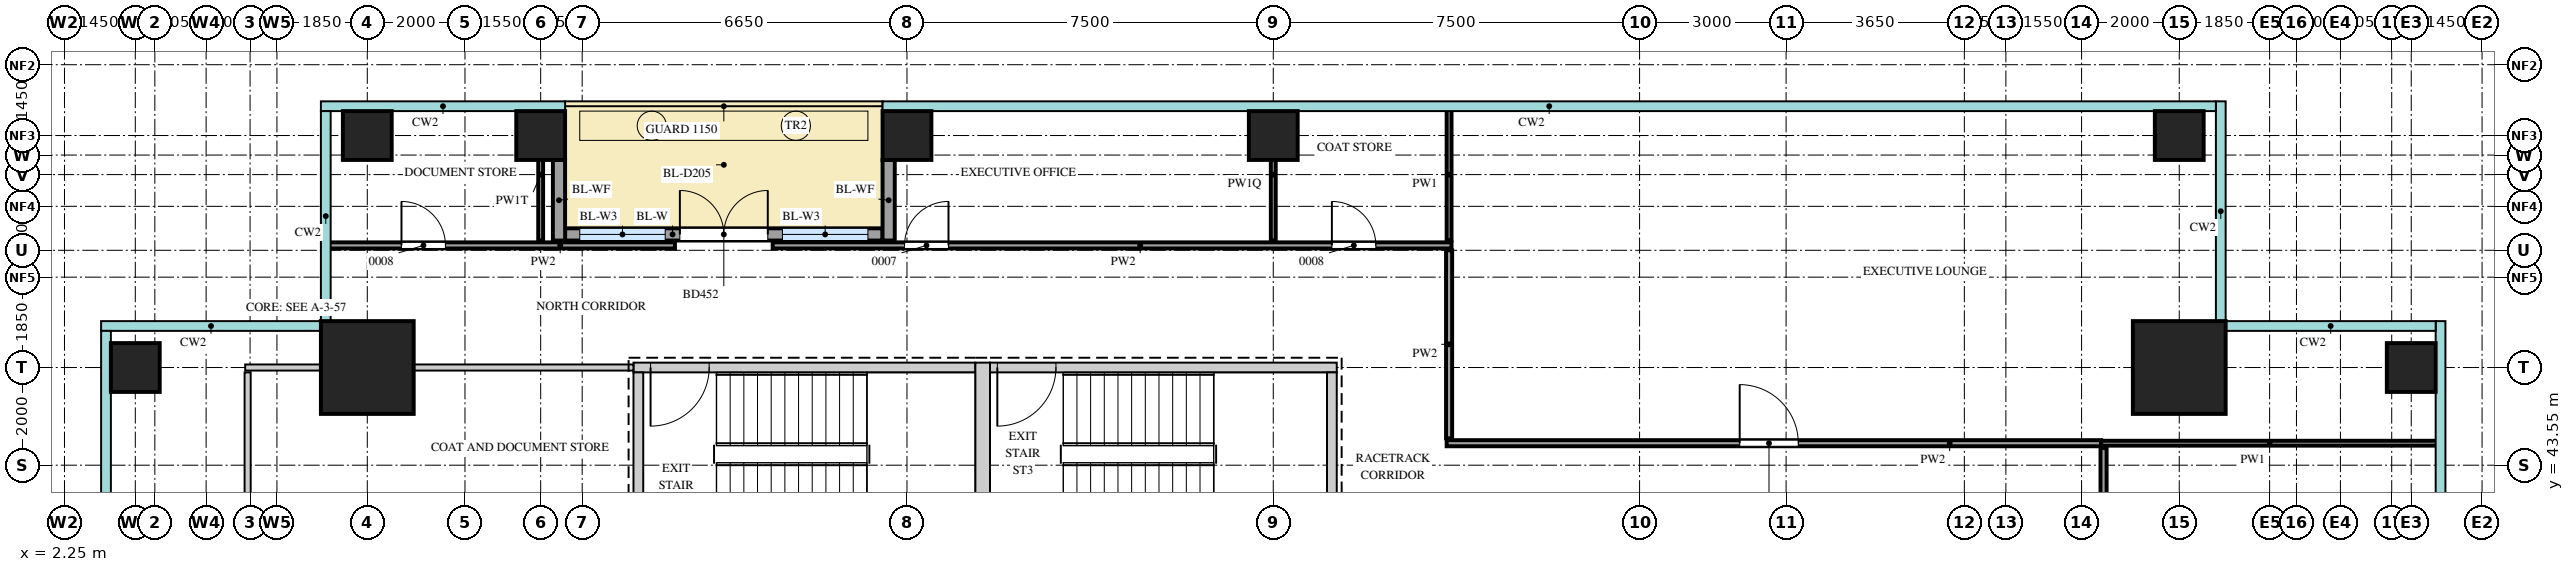
"""IFC4 building model, lengths in metres.
Left out: names, types, materials, properties, quantities, classifications, styles, units other than length and angle.
Written with IfcOpenShell. Run it as: python <this file> out.ifc"""

import sys

from ifc_helpers import new_model, si_unit, direction, frame, frame_2d, origin, origin_2d, place, context, subcontext, project, spatial, rectangle, extrude, source, transform, mapped, element, fill, save


model = new_model("IFC4")
c1 = context("Model", 3, precision=1e-05, world=origin(), true_north=direction((0.0, 1.0)))
c2 = subcontext(c1, "Body", "Model", "MODEL_VIEW")
j1 = project(units=[si_unit("LENGTHUNIT", "METRE"), si_unit("PLANEANGLEUNIT", "RADIAN")], contexts=[c1])
p1 = place(None, origin())
s1 = spatial("IfcSite", under=j1, at=p1, CompositionType="ELEMENT")
p2 = place(p1, origin())
s2 = spatial("IfcBuilding", under=s1, at=p2, CompositionType="ELEMENT")
p3 = place(p2, frame((0.0, 0.0, 204.7)))
s3 = spatial("IfcBuildingStorey", under=s2, at=p3, CompositionType="ELEMENT", Elevation=204.7)
m1 = source(origin(), c2, "Body", "SweptSolid", [
    extrude(rectangle(XDim=7.0, YDim=0.2, at=frame_2d((3.5, 0.0))), origin(), (0.0, 0.0, 1.0), 3.75),
])
p4 = place(p3, frame((13.9, 45.55, 0.0), z_axis=(0.0, 0.0, 1.0), x_axis=(1.0, 0.0, 0.0)))
e1 = element("IfcWall", 1, at=p4, inside=s3, PredefinedType="SHEAR", context=c2, shape_type="MappedRepresentation", body=[
    mapped(m1, transform((0.0, 0.0, 0.0))),
])
m2 = source(origin(), c2, "Body", "SweptSolid", [
    extrude(rectangle(XDim=1.2, YDim=2.1, at=frame_2d((0.6, 1.05))), frame((0.0, 0.11, 0.0), z_axis=(0.0, -1.0, 0.0), x_axis=(1.0, 0.0, 0.0)), (0.0, 0.0, 1.0), 0.22),
])
p5 = place(p4, frame((0.35, 0.0, 0.0)))
e2 = element("IfcOpeningElement", 2, at=p5, cuts=e1, PredefinedType="OPENING", context=c2, shape_type="MappedRepresentation", body=[
    mapped(m2, transform((0.0, 0.0, 0.0))),
])
m3 = source(origin(), c2, "Body", "SweptSolid", [
    extrude(rectangle(XDim=7.1, YDim=0.2, at=frame_2d((3.55, 0.0))), origin(), (0.0, 0.0, 1.0), 3.75),
])
p6 = place(p3, frame((21.2, 45.55, 0.0), z_axis=(0.0, 0.0, 1.0), x_axis=(1.0, 0.0, 0.0)))
e3 = element("IfcWall", 3, at=p6, inside=s3, PredefinedType="SHEAR", context=c2, shape_type="MappedRepresentation", body=[
    mapped(m3, transform((0.0, 0.0, 0.0))),
])
p7 = place(p6, frame((0.15, 0.0, 0.0)))
e4 = element("IfcOpeningElement", 4, at=p7, cuts=e3, PredefinedType="OPENING", context=c2, shape_type="MappedRepresentation", body=[
    mapped(m2, transform((0.0, 0.0, 0.0))),
])
m4 = source(origin(), c2, "Body", "SweptSolid", [
    extrude(rectangle(XDim=3.75, YDim=0.3, at=frame_2d((1.875, 0.0))), origin(), (0.0, 0.0, 1.0), 3.75),
])
p8 = place(p3, frame((21.05, 41.9, 0.0), z_axis=(0.0, 0.0, 1.0), x_axis=(0.0, 1.0, 0.0)))
e5 = element("IfcWall", 5, at=p8, inside=s3, PredefinedType="SHEAR", context=c2, shape_type="MappedRepresentation", body=[
    mapped(m4, transform((0.0, 0.0, 0.0))),
])
m5 = source(origin(), c2, "Body", "SweptSolid", [
    extrude(rectangle(XDim=3.35, YDim=0.2, at=frame_2d((1.675, 0.0))), origin(), (0.0, 0.0, 1.0), 3.75),
])
for number, where, z_axis, x_axis in (
    (6, (14.0, 42.1, 0.0), (0.0, 0.0, 1.0), (0.0, 1.0, 0.0)),
    (7, (28.2, 42.1, 0.0), (0.0, 0.0, 1.0), (0.0, 1.0, 0.0)),
):
    element("IfcWall", number, at=place(p3, frame(where, z_axis=z_axis, x_axis=x_axis)), inside=s3, PredefinedType="SHEAR", context=c2, shape_type="MappedRepresentation", body=[
        mapped(m5, transform((0.0, 0.0, 0.0))),
    ])
m6 = source(origin(), c2, "Body", "SweptSolid", [
    extrude(rectangle(XDim=1.9, YDim=1.9, at=origin_2d()), origin(), (0.0, 0.0, 1.0), 4.0),
])
for number, where, z_axis, x_axis in (
    (8, (45.55, 45.55, 0.0), (0.0, 0.0, 1.0), (1.0, 0.0, 0.0)),
    (9, (8.45, 45.55, 0.0), (0.0, 0.0, 1.0), (1.0, 0.0, 0.0)),
):
    element("IfcColumn", number, at=place(p3, frame(where, z_axis=z_axis, x_axis=x_axis)), inside=s3, PredefinedType="COLUMN", context=c2, shape_type="MappedRepresentation", body=[
        mapped(m6, transform((0.0, 0.0, 0.0))),
    ])
m7 = source(origin(), c2, "Body", "SweptSolid", [
    extrude(rectangle(XDim=1.0, YDim=1.0, at=origin_2d()), origin(), (0.0, 0.0, 1.0), 3.75),
])
for number, where, z_axis, x_axis in (
    (10, (50.3, 45.55, 0.0), (0.0, 0.0, 1.0), (1.0, 0.0, 0.0)),
    (11, (8.45, 50.3, 0.0), (0.0, 0.0, 1.0), (1.0, 0.0, 0.0)),
    (12, (12.0, 50.3, 0.0), (0.0, 0.0, 1.0), (1.0, 0.0, 0.0)),
    (13, (19.5, 50.3, 0.0), (0.0, 0.0, 1.0), (1.0, 0.0, 0.0)),
    (14, (27.0, 50.3, 0.0), (0.0, 0.0, 1.0), (1.0, 0.0, 0.0)),
    (15, (45.55, 50.3, 0.0), (0.0, 0.0, 1.0), (1.0, 0.0, 0.0)),
    (16, (3.7, 45.55, 0.0), (0.0, 0.0, 1.0), (1.0, 0.0, 0.0)),
):
    element("IfcColumn", number, at=place(p3, frame(where, z_axis=z_axis, x_axis=x_axis)), inside=s3, PredefinedType="COLUMN", context=c2, shape_type="MappedRepresentation", body=[
        mapped(m7, transform((0.0, 0.0, 0.0))),
    ])
m8 = source(origin(), c2, "Body", "SweptSolid", [
    extrude(rectangle(XDim=6.5, YDim=0.25, at=frame_2d((3.25, 0.0))), origin(), (0.0, 0.0, 1.0), 3.75),
])
p9 = place(p3, frame((12.5, 48.275, 0.0), z_axis=(0.0, 0.0, 1.0), x_axis=(1.0, 0.0, 0.0)))
e17 = element("IfcWall", 17, at=p9, inside=s3, PredefinedType="SOLIDWALL", context=c2, shape_type="MappedRepresentation", body=[
    mapped(m8, transform((0.0, 0.0, 0.0))),
])
m9 = source(origin(), c2, "Body", "SweptSolid", [
    extrude(rectangle(XDim=1.75, YDim=2.4, at=frame_2d((0.875, 1.2))), frame((0.0, 0.135, 0.0), z_axis=(0.0, -1.0, 0.0), x_axis=(1.0, 0.0, 0.0)), (0.0, 0.0, 1.0), 0.27),
])
p10 = place(p9, frame((0.3, 0.0, 0.0)))
e18 = element("IfcOpeningElement", 18, at=p10, cuts=e17, PredefinedType="OPENING", context=c2, shape_type="MappedRepresentation", body=[
    mapped(m9, transform((0.0, 0.0, 0.0))),
])
p11 = place(p9, frame((4.45, 0.0, 0.0)))
e19 = element("IfcOpeningElement", 19, at=p11, cuts=e17, PredefinedType="OPENING", context=c2, shape_type="MappedRepresentation", body=[
    mapped(m9, transform((0.0, 0.0, 0.0))),
])
m10 = source(origin(), c2, "Body", "SweptSolid", [
    extrude(rectangle(XDim=1.8, YDim=2.4, at=frame_2d((0.9, 1.2))), frame((0.0, 0.135, 0.0), z_axis=(0.0, -1.0, 0.0), x_axis=(1.0, 0.0, 0.0)), (0.0, 0.0, 1.0), 0.27),
])
p12 = place(p9, frame((2.35, 0.0, 0.0)))
e20 = element("IfcOpeningElement", 20, at=p12, cuts=e17, PredefinedType="OPENING", context=c2, shape_type="MappedRepresentation", body=[
    mapped(m10, transform((0.0, 0.0, 0.0))),
])
m11 = source(origin(), c2, "Body", "SweptSolid", [
    extrude(rectangle(XDim=1.65, YDim=0.25, at=frame_2d((0.825, 0.0))), origin(), (0.0, 0.0, 1.0), 3.45),
])
for number, where, z_axis, x_axis in (
    (21, (12.375, 49.8, 0.0), (0.0, 0.0, 1.0), (0.0, -1.0, 0.0)),
    (22, (19.125, 49.8, 0.0), (0.0, 0.0, 1.0), (0.0, -1.0, 0.0)),
):
    element("IfcWall", number, at=place(p3, frame(where, z_axis=z_axis, x_axis=x_axis)), inside=s3, PredefinedType="SOLIDWALL", context=c2, shape_type="MappedRepresentation", body=[
        mapped(m11, transform((0.0, 0.0, 0.0))),
    ])
m12 = source(origin(), c2, "Body", "SweptSolid", [
    extrude(rectangle(XDim=33.8, YDim=0.125, at=frame_2d((16.9, 0.0))), origin(), (0.0, 0.0, 1.0), 3.8),
])
p13 = place(p3, frame((44.0, 10.1, 0.0), z_axis=(0.0, 0.0, 1.0), x_axis=(0.0, 1.0, 0.0)))
e23 = element("IfcWall", 23, at=p13, inside=s3, PredefinedType="PARTITIONING", context=c2, shape_type="MappedRepresentation", body=[
    mapped(m12, transform((0.0, 0.0, 0.0))),
])
m13 = source(origin(), c2, "Body", "SweptSolid", [
    extrude(rectangle(XDim=0.9, YDim=2.1, at=frame_2d((0.45, 1.05))), frame((0.0, 0.073, 0.0), z_axis=(0.0, -1.0, 0.0), x_axis=(1.0, 0.0, 0.0)), (0.0, 0.0, 1.0), 0.145),
])
p14 = place(p13, frame((9.0, 0.0, 0.0)))
e24 = element("IfcOpeningElement", 24, at=p14, cuts=e23, PredefinedType="OPENING", context=c2, shape_type="MappedRepresentation", body=[
    mapped(m13, transform((0.0, 0.0, 0.0))),
])
p15 = place(p13, frame((23.6, 0.0, 0.0)))
e25 = element("IfcOpeningElement", 25, at=p15, cuts=e23, PredefinedType="OPENING", context=c2, shape_type="MappedRepresentation", body=[
    mapped(m13, transform((0.0, 0.0, 0.0))),
])
m14 = source(origin(), c2, "Body", "SweptSolid", [
    extrude(rectangle(XDim=3.45, YDim=0.125, at=frame_2d((1.725, 0.0))), origin(), (0.0, 0.0, 1.0), 3.8),
])
p16 = place(p3, frame((6.0, 42.0, 0.0), z_axis=(0.0, 0.0, 1.0), x_axis=(0.0, 1.0, 0.0)))
e26 = element("IfcWall", 26, at=p16, inside=s3, PredefinedType="PARTITIONING", context=c2, shape_type="MappedRepresentation", body=[
    mapped(m14, transform((0.0, 0.0, 0.0))),
])
m15 = source(origin(), c2, "Body", "SweptSolid", [
    extrude(rectangle(XDim=13.4, YDim=0.125, at=frame_2d((6.7, 0.0))), origin(), (0.0, 0.0, 1.0), 3.8),
])
p17 = place(p3, frame((30.55, 44.0, 0.0), z_axis=(0.0, 0.0, 1.0), x_axis=(1.0, 0.0, 0.0)))
e27 = element("IfcWall", 27, at=p17, inside=s3, PredefinedType="PARTITIONING", context=c2, shape_type="MappedRepresentation", body=[
    mapped(m15, transform((0.0, 0.0, 0.0))),
])
m16 = source(origin(), c2, "Body", "SweptSolid", [
    extrude(rectangle(XDim=1.2, YDim=2.1, at=frame_2d((0.6, 1.05))), frame((0.0, 0.073, 0.0), z_axis=(0.0, -1.0, 0.0), x_axis=(1.0, 0.0, 0.0)), (0.0, 0.0, 1.0), 0.145),
])
p18 = place(p17, frame((6.0, 0.0, 0.0)))
e28 = element("IfcOpeningElement", 28, at=p18, cuts=e27, PredefinedType="OPENING", context=c2, shape_type="MappedRepresentation", body=[
    mapped(m16, transform((0.0, 0.0, 0.0))),
])
m17 = source(origin(), c2, "Body", "SweptSolid", [
    extrude(rectangle(XDim=6.9, YDim=0.1, at=frame_2d((3.45, 0.0))), origin(), (0.0, 0.0, 1.0), 3.8),
])
p19 = place(p3, frame((43.95, 44.0, 0.0), z_axis=(0.0, 0.0, 1.0), x_axis=(1.0, 0.0, 0.0)))
e29 = element("IfcWall", 29, at=p19, inside=s3, PredefinedType="PARTITIONING", context=c2, shape_type="MappedRepresentation", body=[
    mapped(m17, transform((0.0, 0.0, 0.0))),
])
m18 = source(origin(), c2, "Body", "SweptSolid", [
    extrude(rectangle(XDim=3.85, YDim=0.125, at=frame_2d((1.925, 0.0))), origin(), (0.0, 0.0, 1.0), 3.8),
])
p20 = place(p3, frame((30.6, 44.1, 0.0), z_axis=(0.0, 0.0, 1.0), x_axis=(0.0, 1.0, 0.0)))
e30 = element("IfcWall", 30, at=p20, inside=s3, PredefinedType="PARTITIONING", context=c2, shape_type="MappedRepresentation", body=[
    mapped(m18, transform((0.0, 0.0, 0.0))),
])
m19 = source(origin(), c2, "Body", "SweptSolid", [
    extrude(rectangle(XDim=7.95, YDim=0.125, at=frame_2d((3.975, 0.0))), origin(), (0.0, 0.0, 1.0), 3.25),
])
p21 = place(p3, frame((5.95, 45.55, 0.0), z_axis=(0.0, 0.0, 1.0), x_axis=(1.0, 0.0, 0.0)))
e31 = element("IfcWall", 31, at=p21, inside=s3, PredefinedType="PARTITIONING", context=c2, shape_type="MappedRepresentation", body=[
    mapped(m19, transform((0.0, 0.0, 0.0))),
])
m20 = source(origin(), c2, "Body", "SweptSolid", [
    extrude(rectangle(XDim=2.7, YDim=0.1, at=frame_2d((1.35, 0.0))), origin(), (0.0, 0.0, 1.0), 3.3),
])
p22 = place(p3, frame((12.0, 48.15, 0.0), z_axis=(0.0, 0.0, 1.0), x_axis=(0.0, 1.0, 0.0)))
e32 = element("IfcWall", 32, at=p22, inside=s3, PredefinedType="PARTITIONING", context=c2, shape_type="MappedRepresentation", body=[
    mapped(m20, transform((0.0, 0.0, 0.0))),
])
m21 = source(origin(), c2, "Body", "SweptSolid", [
    extrude(rectangle(XDim=2.7, YDim=0.1, at=frame_2d((1.35, 0.0))), origin(), (0.0, 0.0, 1.0), 3.42),
])
p23 = place(p3, frame((27.0, 48.15, 0.0), z_axis=(0.0, 0.0, 1.0), x_axis=(0.0, 1.0, 0.0)))
e33 = element("IfcWall", 33, at=p23, inside=s3, PredefinedType="PARTITIONING", context=c2, shape_type="MappedRepresentation", body=[
    mapped(m21, transform((0.0, 0.0, 0.0))),
])
m22 = source(origin(), c2, "Body", "SweptSolid", [
    extrude(rectangle(XDim=2.7, YDim=0.1, at=frame_2d((1.35, 0.0))), origin(), (0.0, 0.0, 1.0), 3.8),
])
p24 = place(p3, frame((30.6, 48.15, 0.0), z_axis=(0.0, 0.0, 1.0), x_axis=(0.0, 1.0, 0.0)))
e34 = element("IfcWall", 34, at=p24, inside=s3, PredefinedType="PARTITIONING", context=c2, shape_type="MappedRepresentation", body=[
    mapped(m22, transform((0.0, 0.0, 0.0))),
])
m23 = source(origin(), c2, "Body", "SweptSolid", [
    extrude(rectangle(XDim=7.1, YDim=0.125, at=frame_2d((3.55, 0.0))), origin(), (0.0, 0.0, 1.0), 3.8),
])
p25 = place(p3, frame((7.65, 48.05, 0.0), z_axis=(0.0, 0.0, 1.0), x_axis=(1.0, 0.0, 0.0)))
e35 = element("IfcWall", 35, at=p25, inside=s3, PredefinedType="PARTITIONING", context=c2, shape_type="MappedRepresentation", body=[
    mapped(m23, transform((0.0, 0.0, 0.0))),
])
p26 = place(p25, frame((1.5, 0.0, 0.0)))
e36 = element("IfcOpeningElement", 36, at=p26, cuts=e35, PredefinedType="OPENING", context=c2, shape_type="MappedRepresentation", body=[
    mapped(m13, transform((0.0, 0.0, 0.0))),
])
m24 = source(origin(), c2, "Body", "SweptSolid", [
    extrude(rectangle(XDim=13.9, YDim=0.125, at=frame_2d((6.95, 0.0))), origin(), (0.0, 0.0, 1.0), 3.8),
])
p27 = place(p3, frame((16.75, 48.05, 0.0), z_axis=(0.0, 0.0, 1.0), x_axis=(1.0, 0.0, 0.0)))
e37 = element("IfcWall", 37, at=p27, inside=s3, PredefinedType="PARTITIONING", context=c2, shape_type="MappedRepresentation", body=[
    mapped(m24, transform((0.0, 0.0, 0.0))),
])
p28 = place(p27, frame((2.7, 0.0, 0.0)))
e38 = element("IfcOpeningElement", 38, at=p28, cuts=e37, PredefinedType="OPENING", context=c2, shape_type="MappedRepresentation", body=[
    mapped(m13, transform((0.0, 0.0, 0.0))),
])
p29 = place(p27, frame((11.45, 0.0, 0.0)))
e39 = element("IfcOpeningElement", 39, at=p29, cuts=e37, PredefinedType="OPENING", context=c2, shape_type="MappedRepresentation", body=[
    mapped(m13, transform((0.0, 0.0, 0.0))),
])
m25 = source(origin(), c2, "Body", "SweptSolid", [
    extrude(rectangle(XDim=1.75, YDim=2.4, at=frame_2d((0.875, 1.2))), frame((0.0, 0.03, 0.0), z_axis=(0.0, -1.0, 0.0), x_axis=(1.0, 0.0, 0.0)), (0.0, 0.0, 1.0), 0.06),
])
p30 = place(p10, origin())
e40 = element("IfcWindow", 40, at=p30, inside=s3, PartitioningType="SINGLE_PANEL", PredefinedType="WINDOW", context=c2, shape_type="MappedRepresentation", body=[
    mapped(m25, transform((0.0, 0.0, 0.0))),
])
fill(e18, e40)
p31 = place(p11, origin())
e41 = element("IfcWindow", 41, at=p31, inside=s3, PartitioningType="SINGLE_PANEL", PredefinedType="WINDOW", context=c2, shape_type="MappedRepresentation", body=[
    mapped(m25, transform((0.0, 0.0, 0.0))),
])
fill(e19, e41)
m26 = source(origin(), c2, "Body", "SweptSolid", [
    extrude(rectangle(XDim=1.8, YDim=2.4, at=frame_2d((0.9, 1.2))), frame((0.0, 0.025, 0.0), z_axis=(0.0, -1.0, 0.0), x_axis=(1.0, 0.0, 0.0)), (0.0, 0.0, 1.0), 0.05),
])
p32 = place(p12, origin())
e42 = element("IfcDoor", 42, at=p32, inside=s3, OperationType="DOUBLE_DOOR_DOUBLE_SWING", PredefinedType="DOOR", context=c2, shape_type="MappedRepresentation", body=[
    mapped(m26, transform((0.0, 0.0, 0.0))),
])
fill(e20, e42)
m27 = source(origin(), c2, "Body", "SweptSolid", [
    extrude(rectangle(XDim=1.2, YDim=2.1, at=frame_2d((0.6, 1.05))), frame((0.0, 0.025, 0.0), z_axis=(0.0, -1.0, 0.0), x_axis=(1.0, 0.0, 0.0)), (0.0, 0.0, 1.0), 0.05),
])
p33 = place(p18, origin())
e43 = element("IfcDoor", 43, at=p33, inside=s3, OperationType="SINGLE_SWING_RIGHT", PredefinedType="DOOR", context=c2, shape_type="MappedRepresentation", body=[
    mapped(m27, transform((0.0, 0.0, 0.0))),
])
fill(e28, e43)
m28 = source(origin(), c2, "Body", "SweptSolid", [
    extrude(rectangle(XDim=0.9, YDim=2.1, at=frame_2d((0.45, 1.05))), frame((0.0, 0.025, 0.0), z_axis=(0.0, -1.0, 0.0), x_axis=(1.0, 0.0, 0.0)), (0.0, 0.0, 1.0), 0.05),
])
p34 = place(p26, origin())
e44 = element("IfcDoor", 44, at=p34, inside=s3, OperationType="SINGLE_SWING_RIGHT", PredefinedType="DOOR", context=c2, shape_type="MappedRepresentation", body=[
    mapped(m28, transform((0.0, 0.0, 0.0))),
])
fill(e36, e44)
p35 = place(p28, origin())
e45 = element("IfcDoor", 45, at=p35, inside=s3, OperationType="SINGLE_SWING_LEFT", PredefinedType="DOOR", context=c2, shape_type="MappedRepresentation", body=[
    mapped(m28, transform((0.0, 0.0, 0.0))),
])
fill(e38, e45)
p36 = place(p29, origin())
e46 = element("IfcDoor", 46, at=p36, inside=s3, OperationType="SINGLE_SWING_RIGHT", PredefinedType="DOOR", context=c2, shape_type="MappedRepresentation", body=[
    mapped(m28, transform((0.0, 0.0, 0.0))),
])
fill(e39, e46)
p37 = place(p5, origin())
e47 = element("IfcDoor", 47, at=p37, inside=s3, OperationType="SINGLE_SWING_LEFT", PredefinedType="DOOR", context=c2, shape_type="MappedRepresentation", body=[
    mapped(m27, transform((0.0, 0.0, 0.0))),
])
fill(e2, e47)
p38 = place(p7, origin())
e48 = element("IfcDoor", 48, at=p38, inside=s3, OperationType="SINGLE_SWING_LEFT", PredefinedType="DOOR", context=c2, shape_type="MappedRepresentation", body=[
    mapped(m27, transform((0.0, 0.0, 0.0))),
])
fill(e4, e48)
save(model, sys.argv[1])
